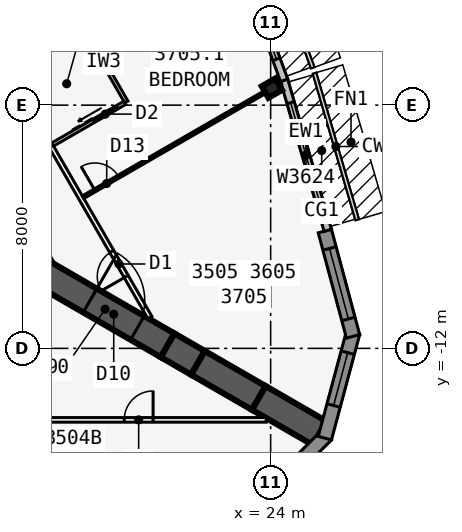
"""IFC4 building model, lengths in metres.
Left out: names, types, materials, properties, quantities, classifications, styles, units other than length and angle.
Written with IfcOpenShell. Run it as: python <this file> out.ifc"""

import sys

from ifc_helpers import new_model, si_unit, direction, frame, frame_2d, origin, origin_2d, place, context, subcontext, project, spatial, polyline, rectangle, i_section, outline, extrude, element, fill, save


model = new_model("IFC4")
c1 = context("Model", 3, precision=1e-05, world=origin(), true_north=direction((0.0, 1.0)))
c2 = subcontext(c1, "Body", "Model", "MODEL_VIEW")
j1 = project(units=[si_unit("LENGTHUNIT", "METRE"), si_unit("PLANEANGLEUNIT", "RADIAN")], contexts=[c1])
p1 = place(None, origin())
s1 = spatial("IfcSite", under=j1, at=p1, CompositionType="ELEMENT")
p2 = place(p1, origin())
s2 = spatial("IfcBuilding", under=s1, at=p2, CompositionType="ELEMENT")
p3 = place(p2, frame((0.0, 0.0, 135.1)))
s3 = spatial("IfcBuildingStorey", under=s2, at=p3, CompositionType="ELEMENT", Elevation=135.1)
p4 = place(p3, frame((16.5, -9.526, 0.0), z_axis=(0.0, 0.0, 1.0), x_axis=(-0.499999749417, 0.866025548458, 0.0)))
e1 = element("IfcWall", 1, at=p4, inside=s3, PredefinedType="SHEAR", context=c2, shape_type="SweptSolid", body=[
    extrude(rectangle(XDim=33.0, YDim=0.9, at=frame_2d((16.5, 0.0))), origin(), (0.0, 0.0, 1.0), 3.4),
])
p5 = place(p4, frame((14.15, 0.0, 0.0)))
e2 = element("IfcOpeningElement", 2, at=p5, cuts=e1, PredefinedType="OPENING", context=c2, shape_type="SweptSolid", body=[
    extrude(rectangle(XDim=1.8, YDim=2.13, at=frame_2d((0.9, 1.065))), frame((0.0, 0.46, 0.0), z_axis=(0.0, -1.0, 0.0), x_axis=(1.0, 0.0, 0.0)), (0.0, 0.0, 1.0), 0.92),
])
p6 = place(p4, frame((12.6, 0.0, 0.0)))
e3 = element("IfcOpeningElement", 3, at=p6, cuts=e1, PredefinedType="OPENING", context=c2, shape_type="SweptSolid", body=[
    extrude(rectangle(XDim=1.0, YDim=2.13, at=frame_2d((0.5, 1.065))), frame((0.0, 0.46, 0.0), z_axis=(0.0, -1.0, 0.0), x_axis=(1.0, 0.0, 0.0)), (0.0, 0.0, 1.0), 0.92),
])
p7 = place(p3, frame((16.5, -9.526, 0.0), z_axis=(0.0, 0.0, 1.0), x_axis=(0.866031398331, -0.499989616998, 0.0)))
e4 = element("IfcWall", 4, at=p7, inside=s3, PredefinedType="SHEAR", context=c2, shape_type="SweptSolid", body=[
    extrude(rectangle(XDim=4.746, YDim=0.9, at=frame_2d((2.373, 0.0))), origin(), (0.0, 0.0, 1.0), 3.4),
])
p8 = place(p7, frame((1.8, 0.0, 0.0)))
e5 = element("IfcOpeningElement", 5, at=p8, cuts=e4, PredefinedType="OPENING", context=c2, shape_type="SweptSolid", body=[
    extrude(rectangle(XDim=1.8, YDim=2.13, at=frame_2d((0.9, 1.065))), frame((0.0, 0.46, 0.0), z_axis=(0.0, -1.0, 0.0), x_axis=(1.0, 0.0, 0.0)), (0.0, 0.0, 1.0), 0.92),
])
p9 = place(p3, frame((20.61, -11.899, 0.0), z_axis=(0.0, 0.0, 1.0), x_axis=(0.866009537788, -0.500027479704, 0.0)))
e6 = element("IfcWall", 6, at=p9, inside=s3, PredefinedType="SHEAR", context=c2, shape_type="SweptSolid", body=[
    extrude(rectangle(XDim=1.155, YDim=0.9, at=frame_2d((0.577, 0.0))), origin(), (0.0, 0.0, 1.0), 3.4),
])
for number, where, z_axis, x_axis in (
    (7, (21.61, -12.477, 0.0), (0.0, 0.0, 1.0), (0.866, -0.5, 0.0)),
    (8, (23.61, -13.631, 0.0), (0.0, 0.0, 1.0), (0.866, -0.5, 0.0)),
):
    element("IfcWall", number, at=place(p3, frame(where, z_axis=z_axis, x_axis=x_axis)), inside=s3, PredefinedType="SHEAR", context=c2, shape_type="SweptSolid", body=[
        extrude(rectangle(XDim=2.309, YDim=0.9, at=frame_2d((1.155, 0.0))), origin(), (0.0, 0.0, 1.0), 3.4),
    ])
p10 = place(p3, frame((24.041, -3.44, 0.0), z_axis=(0.0, 0.0, 1.0), x_axis=(-0.5, 0.866025403784, 0.0)))
e9 = element("IfcColumn", 9, at=p10, inside=s3, PredefinedType="COLUMN", context=c2, shape_type="SweptSolid", body=[
    extrude(i_section(OverallWidth=0.437, OverallDepth=0.513, WebThickness=0.061, FlangeThickness=0.097, at=origin_2d()), origin(), (0.0, 0.0, 1.0), 3.4),
])
p11 = place(p3, frame((23.305, -17.388, 0.0), z_axis=(0.0, 0.0, 1.0), x_axis=(0.707106781187, 0.707106781187, 0.0)))
e10 = element("IfcWall", 10, at=p11, inside=s3, PredefinedType="SOLIDWALL", context=c2, shape_type="SweptSolid", body=[
    extrude(outline(polyline([(3.586, 0.225), (3.527, 0.225), (3.035, 0.093), (3.0, 0.225), (0.0, 0.225), (0.0, -0.225), (3.586, -0.225), (3.586, 0.225)])), origin(), (0.0, 0.0, 1.0), 3.235),
])
p12 = place(p11, frame((0.675, 0.0, 0.45)))
e11 = element("IfcOpeningElement", 11, at=p12, cuts=e10, PredefinedType="OPENING", context=c2, shape_type="SweptSolid", body=[
    extrude(rectangle(XDim=1.8, YDim=2.4, at=frame_2d((0.9, 1.2))), frame((0.0, 0.235, 0.0), z_axis=(0.0, -1.0, 0.0), x_axis=(1.0, 0.0, 0.0)), (0.0, 0.0, 1.0), 0.47),
])
p13 = place(p3, frame((25.783, -14.953, 0.0), z_axis=(0.0, 0.0, 1.0), x_axis=(0.258823421857, 0.965924653531, 0.0)))
e12 = element("IfcWall", 12, at=p13, inside=s3, PredefinedType="SOLIDWALL", context=c2, shape_type="SweptSolid", body=[
    extrude(outline(polyline([(3.586, 0.225), (0.586, 0.225), (0.551, 0.093), (0.06, 0.225), (0.0, 0.225), (0.0, -0.225), (3.586, -0.225), (3.586, 0.225)])), origin(), (0.0, 0.0, 1.0), 3.235),
])
p14 = place(p13, frame((1.111, 0.0, 0.45)))
e13 = element("IfcOpeningElement", 13, at=p14, cuts=e12, PredefinedType="OPENING", context=c2, shape_type="SweptSolid", body=[
    extrude(rectangle(XDim=1.8, YDim=2.4, at=frame_2d((0.9, 1.2))), frame((0.0, 0.235, 0.0), z_axis=(0.0, -1.0, 0.0), x_axis=(1.0, 0.0, 0.0)), (0.0, 0.0, 1.0), 0.47),
])
p15 = place(p3, frame((26.711, -11.605, 0.0), z_axis=(0.0, 0.0, 1.0), x_axis=(-0.258823421857, 0.965924653531, 0.0)))
e14 = element("IfcWall", 14, at=p15, inside=s3, PredefinedType="SOLIDWALL", context=c2, shape_type="SweptSolid", body=[
    extrude(rectangle(XDim=3.586, YDim=0.45, at=frame_2d((1.793, 0.0))), origin(), (0.0, 0.0, 1.0), 3.235),
])
p16 = place(p15, frame((0.593, 0.0, 0.45)))
e15 = element("IfcOpeningElement", 15, at=p16, cuts=e14, PredefinedType="OPENING", context=c2, shape_type="SweptSolid", body=[
    extrude(rectangle(XDim=2.4, YDim=2.4, at=frame_2d((1.2, 1.2))), frame((0.0, 0.235, 0.0), z_axis=(0.0, -1.0, 0.0), x_axis=(1.0, 0.0, 0.0)), (0.0, 0.0, 1.0), 0.47),
])
p17 = place(p3, frame((25.88, -8.118, 0.0), z_axis=(0.0, 0.0, 1.0), x_axis=(-0.279528287117, 0.960137457191, 0.0)))
e16 = element("IfcWall", 16, at=p17, inside=s3, PredefinedType="STANDARD", context=c2, shape_type="SweptSolid", body=[
    extrude(rectangle(XDim=5.148, YDim=0.25, at=frame_2d((2.574, 0.0))), origin(), (0.0, 0.0, 1.0), 3.235),
])
p18 = place(p17, frame((0.774, 0.0, 0.45)))
e17 = element("IfcOpeningElement", 17, at=p18, cuts=e16, PredefinedType="OPENING", context=c2, shape_type="SweptSolid", body=[
    extrude(rectangle(XDim=3.6, YDim=2.4, at=frame_2d((1.8, 1.2))), frame((0.0, 0.135, 0.0), z_axis=(0.0, -1.0, 0.0), x_axis=(1.0, 0.0, 0.0)), (0.0, 0.0, 1.0), 0.27),
])
p19 = place(p3, frame((24.444, -3.183, 0.0), z_axis=(0.0, 0.0, 1.0), x_axis=(-0.343225593282, 0.939252996863, 0.0)))
e18 = element("IfcWall", 18, at=p19, inside=s3, PredefinedType="STANDARD", context=c2, shape_type="SweptSolid", body=[
    extrude(rectangle(XDim=5.076, YDim=0.25, at=frame_2d((2.538, 0.0))), origin(), (0.0, 0.0, 1.0), 3.235),
])
p20 = place(p19, frame((0.738, 0.0, 0.45)))
e19 = element("IfcOpeningElement", 19, at=p20, cuts=e18, PredefinedType="OPENING", context=c2, shape_type="SweptSolid", body=[
    extrude(rectangle(XDim=3.6, YDim=2.4, at=frame_2d((1.8, 1.2))), frame((0.0, 0.135, 0.0), z_axis=(0.0, -1.0, 0.0), x_axis=(1.0, 0.0, 0.0)), (0.0, 0.0, 1.0), 0.27),
])
p21 = place(p3, frame((-23.857, -14.351, 0.0), z_axis=(0.0, 0.0, 1.0), x_axis=(1.0, 0.0, 0.0)))
e20 = element("IfcWall", 20, at=p21, inside=s3, PredefinedType="PARTITIONING", context=c2, shape_type="SweptSolid", body=[
    extrude(rectangle(XDim=47.714, YDim=0.15, at=frame_2d((23.857, 0.0))), origin(), (0.0, 0.0, 1.0), 3.235),
])
p22 = place(p21, frame((4.682, 0.0, 0.0)))
e21 = element("IfcOpeningElement", 21, at=p22, cuts=e20, PredefinedType="OPENING", context=c2, shape_type="SweptSolid", body=[
    extrude(rectangle(XDim=0.95, YDim=2.13, at=frame_2d((0.475, 1.065))), frame((0.0, 0.085, 0.0), z_axis=(0.0, -1.0, 0.0), x_axis=(1.0, 0.0, 0.0)), (0.0, 0.0, 1.0), 0.17),
])
p23 = place(p21, frame((15.882, 0.0, 0.0)))
e22 = element("IfcOpeningElement", 22, at=p23, cuts=e20, PredefinedType="OPENING", context=c2, shape_type="SweptSolid", body=[
    extrude(rectangle(XDim=0.95, YDim=2.13, at=frame_2d((0.475, 1.065))), frame((0.0, 0.085, 0.0), z_axis=(0.0, -1.0, 0.0), x_axis=(1.0, 0.0, 0.0)), (0.0, 0.0, 1.0), 0.17),
])
p24 = place(p21, frame((25.857, 0.0, 0.0)))
e23 = element("IfcOpeningElement", 23, at=p24, cuts=e20, PredefinedType="OPENING", context=c2, shape_type="SweptSolid", body=[
    extrude(rectangle(XDim=1.0, YDim=2.13, at=frame_2d((0.5, 1.065))), frame((0.0, 0.085, 0.0), z_axis=(0.0, -1.0, 0.0), x_axis=(1.0, 0.0, 0.0)), (0.0, 0.0, 1.0), 0.17),
])
p25 = place(p21, frame((30.282, 0.0, 0.0)))
e24 = element("IfcOpeningElement", 24, at=p25, cuts=e20, PredefinedType="OPENING", context=c2, shape_type="SweptSolid", body=[
    extrude(rectangle(XDim=0.95, YDim=2.13, at=frame_2d((0.475, 1.065))), frame((0.0, 0.085, 0.0), z_axis=(0.0, -1.0, 0.0), x_axis=(1.0, 0.0, 0.0)), (0.0, 0.0, 1.0), 0.17),
])
p26 = place(p21, frame((43.041, 0.0, 0.0)))
e25 = element("IfcOpeningElement", 25, at=p26, cuts=e20, PredefinedType="OPENING", context=c2, shape_type="SweptSolid", body=[
    extrude(rectangle(XDim=0.95, YDim=2.13, at=frame_2d((0.475, 1.065))), frame((0.0, 0.085, 0.0), z_axis=(0.0, -1.0, 0.0), x_axis=(1.0, 0.0, 0.0)), (0.0, 0.0, 1.0), 0.17),
])
p27 = place(p3, frame((20.027, -10.985, 0.0), z_axis=(0.0, 0.0, 1.0), x_axis=(-0.500001677587, 0.866024435227, 0.0)))
e26 = element("IfcWall", 26, at=p27, inside=s3, PredefinedType="PARTITIONING", context=c2, shape_type="SweptSolid", body=[
    extrude(rectangle(XDim=39.054, YDim=0.15, at=frame_2d((19.527, 0.0))), origin(), (0.0, 0.0, 1.0), 3.235),
])
p28 = place(p27, frame((1.558, 0.0, 0.0)))
e27 = element("IfcOpeningElement", 27, at=p28, cuts=e26, PredefinedType="OPENING", context=c2, shape_type="SweptSolid", body=[
    extrude(rectangle(XDim=0.95, YDim=2.13, at=frame_2d((0.475, 1.065))), frame((0.0, 0.085, 0.0), z_axis=(0.0, -1.0, 0.0), x_axis=(1.0, 0.0, 0.0)), (0.0, 0.0, 1.0), 0.17),
])
p29 = place(p27, frame((10.352, 0.0, 0.0)))
e28 = element("IfcOpeningElement", 28, at=p29, cuts=e26, PredefinedType="OPENING", context=c2, shape_type="SweptSolid", body=[
    extrude(rectangle(XDim=0.95, YDim=2.13, at=frame_2d((0.475, 1.065))), frame((0.0, 0.085, 0.0), z_axis=(0.0, -1.0, 0.0), x_axis=(1.0, 0.0, 0.0)), (0.0, 0.0, 1.0), 0.17),
])
p30 = place(p27, frame((17.152, 0.0, 0.0)))
e29 = element("IfcOpeningElement", 29, at=p30, cuts=e26, PredefinedType="OPENING", context=c2, shape_type="SweptSolid", body=[
    extrude(rectangle(XDim=0.95, YDim=2.13, at=frame_2d((0.475, 1.065))), frame((0.0, 0.085, 0.0), z_axis=(0.0, -1.0, 0.0), x_axis=(1.0, 0.0, 0.0)), (0.0, 0.0, 1.0), 0.17),
])
p31 = place(p27, frame((20.952, 0.0, 0.0)))
e30 = element("IfcOpeningElement", 30, at=p31, cuts=e26, PredefinedType="OPENING", context=c2, shape_type="SweptSolid", body=[
    extrude(rectangle(XDim=0.95, YDim=2.13, at=frame_2d((0.475, 1.065))), frame((0.0, 0.085, 0.0), z_axis=(0.0, -1.0, 0.0), x_axis=(1.0, 0.0, 0.0)), (0.0, 0.0, 1.0), 0.17),
])
p32 = place(p27, frame((27.152, 0.0, 0.0)))
e31 = element("IfcOpeningElement", 31, at=p32, cuts=e26, PredefinedType="OPENING", context=c2, shape_type="SweptSolid", body=[
    extrude(rectangle(XDim=0.95, YDim=2.13, at=frame_2d((0.475, 1.065))), frame((0.0, 0.085, 0.0), z_axis=(0.0, -1.0, 0.0), x_axis=(1.0, 0.0, 0.0)), (0.0, 0.0, 1.0), 0.17),
])
p33 = place(p27, frame((36.546, 0.0, 0.0)))
e32 = element("IfcOpeningElement", 32, at=p33, cuts=e26, PredefinedType="OPENING", context=c2, shape_type="SweptSolid", body=[
    extrude(rectangle(XDim=0.95, YDim=2.13, at=frame_2d((0.475, 1.065))), frame((0.0, 0.085, 0.0), z_axis=(0.0, -1.0, 0.0), x_axis=(1.0, 0.0, 0.0)), (0.0, 0.0, 1.0), 0.17),
])
p34 = place(p3, frame((17.829, -7.027, 0.0), z_axis=(0.0, 0.0, 1.0), x_axis=(0.866029804378, 0.499992377871, 0.0)))
e33 = element("IfcWall", 33, at=p34, inside=s3, PredefinedType="PARTITIONING", context=c2, shape_type="SweptSolid", body=[
    extrude(rectangle(XDim=7.516, YDim=0.1, at=frame_2d((3.758, 0.0))), origin(), (0.0, 0.0, 1.0), 2.389),
])
p35 = place(p34, frame((0.45, 0.0, 0.0)))
e34 = element("IfcOpeningElement", 34, at=p35, cuts=e33, PredefinedType="OPENING", context=c2, shape_type="SweptSolid", body=[
    extrude(rectangle(XDim=0.9, YDim=2.13, at=frame_2d((0.45, 1.065))), frame((0.0, 0.06, 0.0), z_axis=(0.0, -1.0, 0.0), x_axis=(1.0, 0.0, 0.0)), (0.0, 0.0, 1.0), 0.12),
])
p36 = place(p3, frame((15.329, -2.697, 0.0), z_axis=(0.0, 0.0, 1.0), x_axis=(0.866024316602, 0.50000188305, 0.0)))
e35 = element("IfcWall", 35, at=p36, inside=s3, PredefinedType="PARTITIONING", context=c2, shape_type="SweptSolid", body=[
    extrude(rectangle(XDim=8.395, YDim=0.15, at=frame_2d((4.198, 0.0))), origin(), (0.0, 0.0, 1.0), 2.389),
])
p37 = place(p3, frame((19.253, -3.895, 0.0), z_axis=(0.0, 0.0, 1.0), x_axis=(-0.499990139034, 0.866031096941, 0.0)))
e36 = element("IfcWall", 36, at=p37, inside=s3, PredefinedType="PLUMBINGWALL", context=c2, shape_type="SweptSolid", body=[
    extrude(rectangle(XDim=3.0, YDim=0.12, at=frame_2d((1.5, 0.0))), origin(), (0.0, 0.0, 1.0), 3.235),
])
p38 = place(p3, frame((16.829, -5.295, 0.0), z_axis=(0.0, 0.0, 1.0), x_axis=(0.866035715982, 0.499982138324, 0.0)))
e37 = element("IfcWall", 37, at=p38, inside=s3, PredefinedType="PLUMBINGWALL", context=c2, shape_type="SweptSolid", body=[
    extrude(rectangle(XDim=2.74, YDim=0.12, at=frame_2d((1.37, 0.0))), origin(), (0.0, 0.0, 1.0), 3.235),
])
p39 = place(p38, frame((1.55, 0.0, 0.0)))
e38 = element("IfcOpeningElement", 38, at=p39, cuts=e37, PredefinedType="OPENING", context=c2, shape_type="SweptSolid", body=[
    extrude(rectangle(XDim=0.9, YDim=2.13, at=frame_2d((0.45, 1.065))), frame((0.0, 0.07, 0.0), z_axis=(0.0, -1.0, 0.0), x_axis=(1.0, 0.0, 0.0)), (0.0, 0.0, 1.0), 0.14),
])
p40 = place(p14, origin())
e39 = element("IfcWindow", 39, at=p40, inside=s3, PartitioningType="SINGLE_PANEL", PredefinedType="WINDOW", context=c2, shape_type="SweptSolid", body=[
    extrude(rectangle(XDim=1.8, YDim=2.4, at=frame_2d((0.9, 1.2))), frame((0.0, 0.03, 0.0), z_axis=(0.0, -1.0, 0.0), x_axis=(1.0, 0.0, 0.0)), (0.0, 0.0, 1.0), 0.06),
])
fill(e13, e39)
p41 = place(p16, origin())
e40 = element("IfcWindow", 40, at=p41, inside=s3, PartitioningType="SINGLE_PANEL", PredefinedType="WINDOW", context=c2, shape_type="SweptSolid", body=[
    extrude(rectangle(XDim=2.4, YDim=2.4, at=frame_2d((1.2, 1.2))), frame((0.0, 0.03, 0.0), z_axis=(0.0, -1.0, 0.0), x_axis=(1.0, 0.0, 0.0)), (0.0, 0.0, 1.0), 0.06),
])
fill(e15, e40)
p42 = place(p18, origin())
e41 = element("IfcWindow", 41, at=p42, inside=s3, PartitioningType="SINGLE_PANEL", PredefinedType="WINDOW", context=c2, shape_type="SweptSolid", body=[
    extrude(rectangle(XDim=3.6, YDim=2.4, at=frame_2d((1.8, 1.2))), frame((0.0, 0.03, 0.0), z_axis=(0.0, -1.0, 0.0), x_axis=(1.0, 0.0, 0.0)), (0.0, 0.0, 1.0), 0.06),
])
fill(e17, e41)
p43 = place(p20, origin())
e42 = element("IfcWindow", 42, at=p43, inside=s3, PartitioningType="SINGLE_PANEL", PredefinedType="WINDOW", context=c2, shape_type="SweptSolid", body=[
    extrude(rectangle(XDim=3.6, YDim=2.4, at=frame_2d((1.8, 1.2))), frame((0.0, 0.03, 0.0), z_axis=(0.0, -1.0, 0.0), x_axis=(1.0, 0.0, 0.0)), (0.0, 0.0, 1.0), 0.06),
])
fill(e19, e42)
p44 = place(p26, origin())
e43 = element("IfcDoor", 43, at=p44, inside=s3, OperationType="SINGLE_SWING_RIGHT", PredefinedType="DOOR", context=c2, shape_type="SweptSolid", body=[
    extrude(rectangle(XDim=0.95, YDim=2.13, at=frame_2d((0.475, 1.065))), frame((0.0, 0.025, 0.0), z_axis=(0.0, -1.0, 0.0), x_axis=(1.0, 0.0, 0.0)), (0.0, 0.0, 1.0), 0.05),
])
fill(e25, e43)
p45 = place(p35, origin())
e44 = element("IfcDoor", 44, at=p45, inside=s3, OperationType="SINGLE_SWING_LEFT", PredefinedType="DOOR", context=c2, shape_type="SweptSolid", body=[
    extrude(rectangle(XDim=0.9, YDim=2.13, at=frame_2d((0.45, 1.065))), frame((0.0, 0.025, 0.0), z_axis=(0.0, -1.0, 0.0), x_axis=(1.0, 0.0, 0.0)), (0.0, 0.0, 1.0), 0.05),
])
fill(e34, e44)
p46 = place(p28, origin())
e45 = element("IfcDoor", 45, at=p46, inside=s3, OperationType="SINGLE_SWING_LEFT", PredefinedType="DOOR", context=c2, shape_type="SweptSolid", body=[
    extrude(rectangle(XDim=0.95, YDim=2.13, at=frame_2d((0.475, 1.065))), frame((0.0, 0.025, 0.0), z_axis=(0.0, -1.0, 0.0), x_axis=(1.0, 0.0, 0.0)), (0.0, 0.0, 1.0), 0.05),
])
fill(e27, e45)
p47 = place(p39, origin())
e46 = element("IfcDoor", 46, at=p47, inside=s3, OperationType="SLIDING_TO_LEFT", PredefinedType="DOOR", context=c2, shape_type="SweptSolid", body=[
    extrude(rectangle(XDim=0.9, YDim=2.13, at=frame_2d((0.45, 1.065))), frame((0.0, 0.025, 0.0), z_axis=(0.0, -1.0, 0.0), x_axis=(1.0, 0.0, 0.0)), (0.0, 0.0, 1.0), 0.05),
])
fill(e38, e46)
p48 = place(p8, origin())
e47 = element("IfcDoor", 47, at=p48, inside=s3, OperationType="DOUBLE_DOOR_DOUBLE_SWING", PredefinedType="DOOR", context=c2, shape_type="SweptSolid", body=[
    extrude(rectangle(XDim=1.8, YDim=2.13, at=frame_2d((0.9, 1.065))), frame((0.0, 0.025, 0.0), z_axis=(0.0, -1.0, 0.0), x_axis=(1.0, 0.0, 0.0)), (0.0, 0.0, 1.0), 0.05),
])
fill(e5, e47)
save(model, sys.argv[1])
